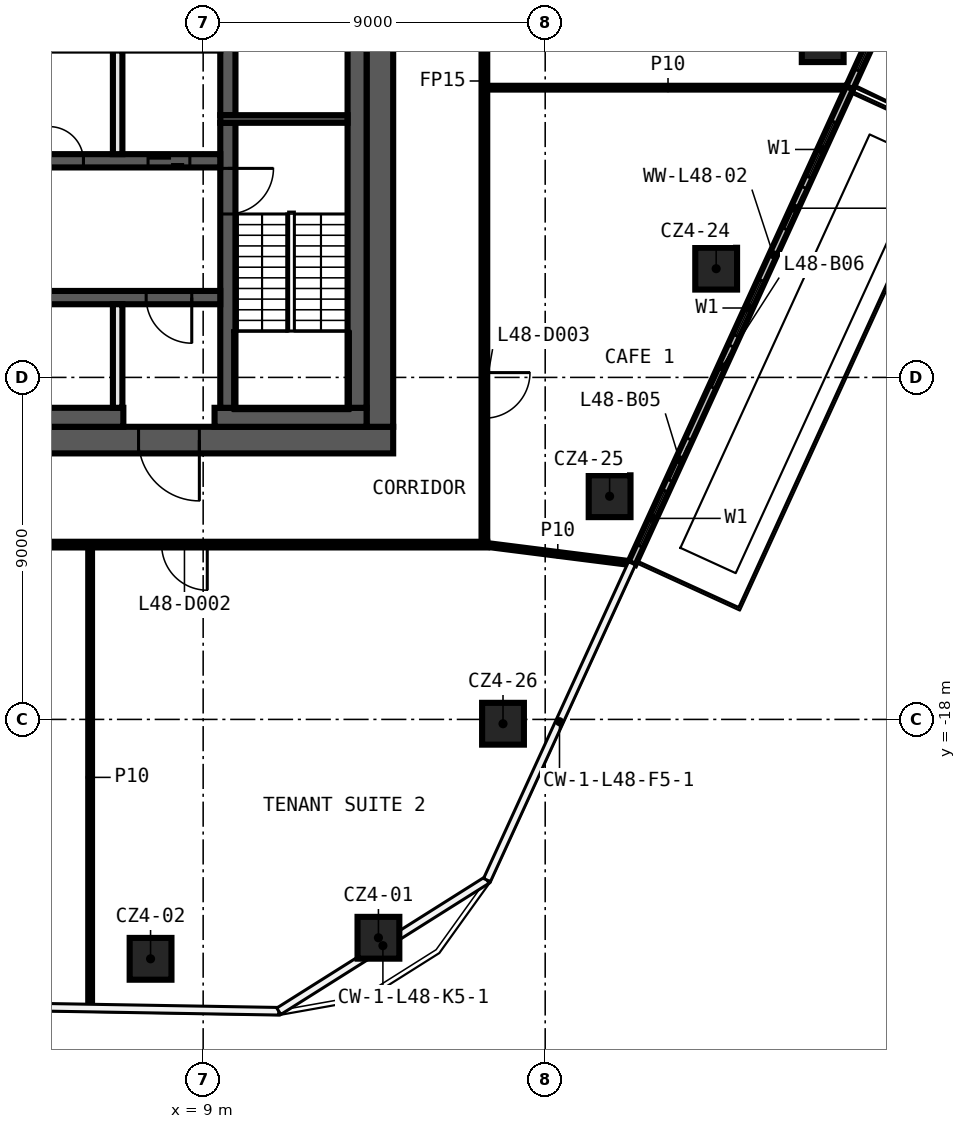
"""IFC4 building model, lengths in metres.
Left out: names, types, materials, properties, quantities, classifications, styles, units other than length and angle.
Written with IfcOpenShell. Run it as: python <this file> out.ifc"""

import sys

from ifc_helpers import new_model, si_unit, direction, frame, frame_2d, origin, origin_2d, place, context, subcontext, project, spatial, rectangle, extrude, element, fill, save


model = new_model("IFC4")
c1 = context("Model", 3, precision=1e-05, world=origin(), true_north=direction((0.0, 1.0)))
c2 = subcontext(c1, "Body", "Model", "MODEL_VIEW")
j1 = project(units=[si_unit("LENGTHUNIT", "METRE"), si_unit("PLANEANGLEUNIT", "RADIAN")], contexts=[c1])
p1 = place(None, origin())
s1 = spatial("IfcSite", under=j1, at=p1, CompositionType="ELEMENT")
p2 = place(p1, origin())
s2 = spatial("IfcBuilding", under=s1, at=p2, CompositionType="ELEMENT")
p3 = place(p2, frame((0.0, 0.0, 232.8)))
s3 = spatial("IfcBuildingStorey", under=s2, at=p3, CompositionType="ELEMENT", Elevation=232.8)
for number, where, z_axis, x_axis in (
    (1, (13.612, -23.746, 0.0), (0.0, 0.0, 1.0), (1.0, 0.0, 0.0)),
    (2, (7.616, -24.3, 0.0), (0.0, 0.0, 1.0), (1.0, 0.0, 0.0)),
    (3, (25.302, -0.152, 0.0), (0.0, 0.0, 1.0), (1.0, 0.0, 0.0)),
    (4, (22.499, -6.139, 0.0), (0.0, 0.0, 1.0), (1.0, 0.0, 0.0)),
    (5, (19.695, -12.127, 0.0), (0.0, 0.0, 1.0), (1.0, 0.0, 0.0)),
    (6, (16.89, -18.114, 0.0), (0.0, 0.0, 1.0), (1.0, 0.0, 0.0)),
):
    element("IfcColumn", number, at=place(p3, frame(where, z_axis=z_axis, x_axis=x_axis)), inside=s3, PredefinedType="COLUMN", context=c2, shape_type="SweptSolid", body=[
        extrude(rectangle(XDim=1.1, YDim=1.1, at=origin_2d()), origin(), (0.0, 0.0, 1.0), 3.75),
    ])
p4 = place(p3, frame((16.475, -13.4, 0.0), z_axis=(0.0, 0.0, 1.0), x_axis=(-1.0, 0.0, 0.0)))
e7 = element("IfcWall", 7, at=p4, inside=s3, PredefinedType="PARTITIONING", context=c2, shape_type="SweptSolid", body=[
    extrude(rectangle(XDim=18.55, YDim=0.15, at=frame_2d((9.275, 0.0))), origin(), (0.0, 0.0, 1.0), 3.75),
])
p5 = place(p4, frame((7.367, 0.0, 0.0)))
e8 = element("IfcOpeningElement", 8, at=p5, cuts=e7, PredefinedType="OPENING", context=c2, shape_type="SweptSolid", body=[
    extrude(rectangle(XDim=1.2, YDim=2.1, at=frame_2d((0.6, 1.05))), frame((0.0, 0.085, 0.0), z_axis=(0.0, -1.0, 0.0), x_axis=(1.0, 0.0, 0.0)), (0.0, 0.0, 1.0), 0.17),
])
p6 = place(p3, frame((16.475, -1.376, 0.0), z_axis=(0.0, 0.0, 1.0), x_axis=(1.0, 0.0, 0.0)))
e9 = element("IfcWall", 9, at=p6, inside=s3, PredefinedType="PARTITIONING", context=c2, shape_type="SweptSolid", body=[
    extrude(rectangle(XDim=9.514, YDim=0.1, at=frame_2d((4.757, 0.0))), origin(), (0.0, 0.0, 1.0), 3.75),
])
p7 = place(p3, frame((16.4, 13.325, 0.0), z_axis=(0.0, 0.0, 1.0), x_axis=(0.0, -1.0, 0.0)))
e10 = element("IfcWall", 10, at=p7, inside=s3, PredefinedType="PARTITIONING", context=c2, shape_type="SweptSolid", body=[
    extrude(rectangle(XDim=26.65, YDim=0.15, at=frame_2d((13.325, 0.0))), origin(), (0.0, 0.0, 1.0), 3.75),
])
p8 = place(p7, frame((22.199, 0.0, 0.0)))
e11 = element("IfcOpeningElement", 11, at=p8, cuts=e10, PredefinedType="OPENING", context=c2, shape_type="SweptSolid", body=[
    extrude(rectangle(XDim=1.2, YDim=2.1, at=frame_2d((0.6, 1.05))), frame((0.0, 0.085, 0.0), z_axis=(0.0, -1.0, 0.0), x_axis=(1.0, 0.0, 0.0)), (0.0, 0.0, 1.0), 0.17),
])
p9 = place(p7, frame((5.651, 0.0, 0.0)))
e12 = element("IfcOpeningElement", 12, at=p9, cuts=e10, PredefinedType="OPENING", context=c2, shape_type="SweptSolid", body=[
    extrude(rectangle(XDim=1.2, YDim=2.1, at=frame_2d((0.6, 1.05))), frame((0.0, 0.085, 0.0), z_axis=(0.0, -1.0, 0.0), x_axis=(1.0, 0.0, 0.0)), (0.0, 0.0, 1.0), 0.17),
])
p10 = place(p3, frame((6.026, -25.576, 0.0), z_axis=(0.0, 0.0, 1.0), x_axis=(0.0, 1.0, 0.0)))
e13 = element("IfcWall", 13, at=p10, inside=s3, PredefinedType="PARTITIONING", context=c2, shape_type="SweptSolid", body=[
    extrude(rectangle(XDim=12.101, YDim=0.1, at=frame_2d((6.05, 0.0))), origin(), (0.0, 0.0, 1.0), 3.75),
])
p11 = place(p3, frame((16.4, -13.4, 0.0), z_axis=(0.0, 0.0, 1.0), x_axis=(0.992073977013, -0.125655179493, 0.0)))
e14 = element("IfcWall", 14, at=p11, inside=s3, PredefinedType="PARTITIONING", context=c2, shape_type="SweptSolid", body=[
    extrude(rectangle(XDim=3.894, YDim=0.1, at=frame_2d((1.947, 0.0))), origin(), (0.0, 0.0, 1.0), 3.75),
])
p12 = place(p3, frame((20.283, -13.892, 0.0), z_axis=(0.0, 0.0, 1.0), x_axis=(0.416106802435, 0.909315747674, 0.0)))
e15 = element("IfcWall", 15, at=p12, inside=s3, PredefinedType="SOLIDWALL", context=c2, shape_type="SweptSolid", body=[
    extrude(rectangle(XDim=13.765, YDim=0.2, at=frame_2d((6.882, 0.0))), origin(), (0.0, 0.0, 1.0), 3.75),
])
p13 = place(p12, frame((0.5, 0.0, 0.6)))
e16 = element("IfcOpeningElement", 16, at=p13, cuts=e15, PredefinedType="OPENING", context=c2, shape_type="SweptSolid", body=[
    extrude(rectangle(XDim=1.6, YDim=2.4, at=frame_2d((0.8, 1.2))), frame((0.0, 0.11, 0.0), z_axis=(0.0, -1.0, 0.0), x_axis=(1.0, 0.0, 0.0)), (0.0, 0.0, 1.0), 0.22),
])
p14 = place(p12, frame((2.4, 0.0, 0.0)))
e17 = element("IfcOpeningElement", 17, at=p14, cuts=e15, PredefinedType="OPENING", context=c2, shape_type="SweptSolid", body=[
    extrude(rectangle(XDim=1.2, YDim=2.4, at=frame_2d((0.6, 1.2))), frame((0.0, 0.11, 0.0), z_axis=(0.0, -1.0, 0.0), x_axis=(1.0, 0.0, 0.0)), (0.0, 0.0, 1.0), 0.22),
])
p15 = place(p12, frame((6.588, 0.0, 0.6)))
e18 = element("IfcOpeningElement", 18, at=p15, cuts=e15, PredefinedType="OPENING", context=c2, shape_type="SweptSolid", body=[
    extrude(rectangle(XDim=1.6, YDim=2.4, at=frame_2d((0.8, 1.2))), frame((0.0, 0.11, 0.0), z_axis=(0.0, -1.0, 0.0), x_axis=(1.0, 0.0, 0.0)), (0.0, 0.0, 1.0), 0.22),
])
p16 = place(p12, frame((5.088, 0.0, 0.0)))
e19 = element("IfcOpeningElement", 19, at=p16, cuts=e15, PredefinedType="OPENING", context=c2, shape_type="SweptSolid", body=[
    extrude(rectangle(XDim=1.2, YDim=2.4, at=frame_2d((0.6, 1.2))), frame((0.0, 0.11, 0.0), z_axis=(0.0, -1.0, 0.0), x_axis=(1.0, 0.0, 0.0)), (0.0, 0.0, 1.0), 0.22),
])
p17 = place(p12, frame((11.176, 0.0, 0.6)))
e20 = element("IfcOpeningElement", 20, at=p17, cuts=e15, PredefinedType="OPENING", context=c2, shape_type="SweptSolid", body=[
    extrude(rectangle(XDim=1.6, YDim=2.4, at=frame_2d((0.8, 1.2))), frame((0.0, 0.11, 0.0), z_axis=(0.0, -1.0, 0.0), x_axis=(1.0, 0.0, 0.0)), (0.0, 0.0, 1.0), 0.22),
])
p18 = place(p12, frame((9.676, 0.0, 0.0)))
e21 = element("IfcOpeningElement", 21, at=p18, cuts=e15, PredefinedType="OPENING", context=c2, shape_type="SweptSolid", body=[
    extrude(rectangle(XDim=1.2, YDim=2.4, at=frame_2d((0.6, 1.2))), frame((0.0, 0.11, 0.0), z_axis=(0.0, -1.0, 0.0), x_axis=(1.0, 0.0, 0.0)), (0.0, 0.0, 1.0), 0.22),
])
p19 = place(p3, frame((26.011, -1.376, 0.0), z_axis=(0.0, 0.0, 1.0), x_axis=(0.416127690122, 0.909306189088, 0.0)))
e22 = element("IfcWall", 22, at=p19, inside=s3, PredefinedType="SOLIDWALL", context=c2, shape_type="SweptSolid", body=[
    extrude(rectangle(XDim=4.579, YDim=0.2, at=frame_2d((2.289, 0.0))), origin(), (0.0, 0.0, 1.0), 3.75),
])
p20 = place(p19, frame((0.5, 0.0, 0.6)))
e23 = element("IfcOpeningElement", 23, at=p20, cuts=e22, PredefinedType="OPENING", context=c2, shape_type="SweptSolid", body=[
    extrude(rectangle(XDim=1.6, YDim=2.4, at=frame_2d((0.8, 1.2))), frame((0.0, 0.11, 0.0), z_axis=(0.0, -1.0, 0.0), x_axis=(1.0, 0.0, 0.0)), (0.0, 0.0, 1.0), 0.22),
])
p21 = place(p19, frame((2.4, 0.0, 0.0)))
e24 = element("IfcOpeningElement", 24, at=p21, cuts=e22, PredefinedType="OPENING", context=c2, shape_type="SweptSolid", body=[
    extrude(rectangle(XDim=1.2, YDim=2.4, at=frame_2d((0.6, 1.2))), frame((0.0, 0.11, 0.0), z_axis=(0.0, -1.0, 0.0), x_axis=(1.0, 0.0, 0.0)), (0.0, 0.0, 1.0), 0.22),
])
p22 = place(p3, frame((14.0, -10.65, 0.0), z_axis=(0.0, 0.0, 1.0), x_axis=(-1.0, 0.0, 0.0)))
e25 = element("IfcWall", 25, at=p22, inside=s3, PredefinedType="SHEAR", context=c2, shape_type="SweptSolid", body=[
    extrude(rectangle(XDim=28.0, YDim=0.7, at=frame_2d((14.0, 0.0))), origin(), (0.0, 0.0, 1.0), 3.75),
])
p23 = place(p22, frame((5.1, 0.0, 0.0)))
e26 = element("IfcOpeningElement", 26, at=p23, cuts=e25, PredefinedType="OPENING", context=c2, shape_type="SweptSolid", body=[
    extrude(rectangle(XDim=1.6, YDim=2.1, at=frame_2d((0.8, 1.05))), frame((0.0, 0.36, 0.0), z_axis=(0.0, -1.0, 0.0), x_axis=(1.0, 0.0, 0.0)), (0.0, 0.0, 1.0), 0.72),
])
p24 = place(p3, frame((13.65, 10.3, 0.0), z_axis=(0.0, 0.0, 1.0), x_axis=(0.0, -1.0, 0.0)))
e27 = element("IfcWall", 27, at=p24, inside=s3, PredefinedType="SHEAR", context=c2, shape_type="SweptSolid", body=[
    extrude(rectangle(XDim=20.6, YDim=0.7, at=frame_2d((10.3, 0.0))), origin(), (0.0, 0.0, 1.0), 3.75),
])
p25 = place(p3, frame((13.3, -10.05, 0.0), z_axis=(0.0, 0.0, 1.0), x_axis=(-1.0, 0.0, 0.0)))
e28 = element("IfcWall", 28, at=p25, inside=s3, PredefinedType="SHEAR", context=c2, shape_type="SweptSolid", body=[
    extrude(rectangle(XDim=4.0, YDim=0.5, at=frame_2d((2.0, 0.0))), origin(), (0.0, 0.0, 1.0), 3.75),
])
p26 = place(p3, frame((6.9, -10.05, 0.0), z_axis=(0.0, 0.0, 1.0), x_axis=(-1.0, 0.0, 0.0)))
e29 = element("IfcWall", 29, at=p26, inside=s3, PredefinedType="SHEAR", context=c2, shape_type="SweptSolid", body=[
    extrude(rectangle(XDim=20.2, YDim=0.5, at=frame_2d((10.1, 0.0))), origin(), (0.0, 0.0, 1.0), 3.75),
])
p27 = place(p3, frame((13.05, 9.8, 0.0), z_axis=(0.0, 0.0, 1.0), x_axis=(0.0, -1.0, 0.0)))
e30 = element("IfcWall", 30, at=p27, inside=s3, PredefinedType="SHEAR", context=c2, shape_type="SweptSolid", body=[
    extrude(rectangle(XDim=19.6, YDim=0.5, at=frame_2d((9.8, 0.0))), origin(), (0.0, 0.0, 1.0), 3.75),
])
p28 = place(p3, frame((9.65, -2.3, 0.0), z_axis=(0.0, 0.0, 1.0), x_axis=(0.0, -1.0, 0.0)))
e31 = element("IfcWall", 31, at=p28, inside=s3, PredefinedType="SHEAR", context=c2, shape_type="SweptSolid", body=[
    extrude(rectangle(XDim=7.5, YDim=0.4, at=frame_2d((3.75, 0.0))), origin(), (0.0, 0.0, 1.0), 3.75),
])
p29 = place(p28, frame((1.2, 0.0, 0.0)))
e32 = element("IfcOpeningElement", 32, at=p29, cuts=e31, PredefinedType="OPENING", context=c2, shape_type="SweptSolid", body=[
    extrude(rectangle(XDim=1.2, YDim=2.1, at=frame_2d((0.6, 1.05))), frame((0.0, 0.21, 0.0), z_axis=(0.0, -1.0, 0.0), x_axis=(1.0, 0.0, 0.0)), (0.0, 0.0, 1.0), 0.42),
])
p30 = place(p3, frame((9.65, 2.1, 0.0), z_axis=(0.0, 0.0, 1.0), x_axis=(0.0, -1.0, 0.0)))
e33 = element("IfcWall", 33, at=p30, inside=s3, PredefinedType="SHEAR", context=c2, shape_type="SweptSolid", body=[
    extrude(rectangle(XDim=4.2, YDim=0.4, at=frame_2d((2.1, 0.0))), origin(), (0.0, 0.0, 1.0), 3.75),
])
p31 = place(p30, frame((0.15, 0.0, 0.0)))
e34 = element("IfcOpeningElement", 34, at=p31, cuts=e33, PredefinedType="OPENING", context=c2, shape_type="SweptSolid", body=[
    extrude(rectangle(XDim=0.9, YDim=2.1, at=frame_2d((0.45, 1.05))), frame((0.0, 0.21, 0.0), z_axis=(0.0, -1.0, 0.0), x_axis=(1.0, 0.0, 0.0)), (0.0, 0.0, 1.0), 0.42),
])
p32 = place(p3, frame((9.45, -2.2, 0.0), z_axis=(0.0, 0.0, 1.0), x_axis=(1.0, 0.0, 0.0)))
e35 = element("IfcWall", 35, at=p32, inside=s3, PredefinedType="SHEAR", context=c2, shape_type="SweptSolid", body=[
    extrude(rectangle(XDim=3.35, YDim=0.2, at=frame_2d((1.675, 0.0))), origin(), (0.0, 0.0, 1.0), 3.75),
])
p33 = place(p3, frame((-9.45, -3.3, 0.0), z_axis=(0.0, 0.0, 1.0), x_axis=(1.0, 0.0, 0.0)))
e36 = element("IfcWall", 36, at=p33, inside=s3, PredefinedType="SHEAR", context=c2, shape_type="SweptSolid", body=[
    extrude(rectangle(XDim=18.9, YDim=0.35, at=frame_2d((9.45, 0.0))), origin(), (0.0, 0.0, 1.0), 3.75),
])
p34 = place(p33, frame((0.8, 0.0, 0.0)))
e37 = element("IfcOpeningElement", 37, at=p34, cuts=e36, PredefinedType="OPENING", context=c2, shape_type="SweptSolid", body=[
    extrude(rectangle(XDim=1.1, YDim=2.1, at=frame_2d((0.55, 1.05))), frame((0.0, 0.185, 0.0), z_axis=(0.0, -1.0, 0.0), x_axis=(1.0, 0.0, 0.0)), (0.0, 0.0, 1.0), 0.37),
])
p35 = place(p33, frame((3.5, 0.0, 0.0)))
e38 = element("IfcOpeningElement", 38, at=p35, cuts=e36, PredefinedType="OPENING", context=c2, shape_type="SweptSolid", body=[
    extrude(rectangle(XDim=1.1, YDim=2.1, at=frame_2d((0.55, 1.05))), frame((0.0, 0.185, 0.0), z_axis=(0.0, -1.0, 0.0), x_axis=(1.0, 0.0, 0.0)), (0.0, 0.0, 1.0), 0.37),
])
p36 = place(p33, frame((6.2, 0.0, 0.0)))
e39 = element("IfcOpeningElement", 39, at=p36, cuts=e36, PredefinedType="OPENING", context=c2, shape_type="SweptSolid", body=[
    extrude(rectangle(XDim=1.1, YDim=2.1, at=frame_2d((0.55, 1.05))), frame((0.0, 0.185, 0.0), z_axis=(0.0, -1.0, 0.0), x_axis=(1.0, 0.0, 0.0)), (0.0, 0.0, 1.0), 0.37),
])
p37 = place(p33, frame((8.9, 0.0, 0.0)))
e40 = element("IfcOpeningElement", 40, at=p37, cuts=e36, PredefinedType="OPENING", context=c2, shape_type="SweptSolid", body=[
    extrude(rectangle(XDim=1.1, YDim=2.1, at=frame_2d((0.55, 1.05))), frame((0.0, 0.185, 0.0), z_axis=(0.0, -1.0, 0.0), x_axis=(1.0, 0.0, 0.0)), (0.0, 0.0, 1.0), 0.37),
])
p38 = place(p33, frame((17.0, 0.0, 0.0)))
e41 = element("IfcOpeningElement", 41, at=p38, cuts=e36, PredefinedType="OPENING", context=c2, shape_type="SweptSolid", body=[
    extrude(rectangle(XDim=1.1, YDim=2.1, at=frame_2d((0.55, 1.05))), frame((0.0, 0.185, 0.0), z_axis=(0.0, -1.0, 0.0), x_axis=(1.0, 0.0, 0.0)), (0.0, 0.0, 1.0), 0.37),
])
p39 = place(p33, frame((11.7, 0.0, 0.0)))
e42 = element("IfcOpeningElement", 42, at=p39, cuts=e36, PredefinedType="OPENING", context=c2, shape_type="SweptSolid", body=[
    extrude(rectangle(XDim=0.9, YDim=2.1, at=frame_2d((0.45, 1.05))), frame((0.0, 0.185, 0.0), z_axis=(0.0, -1.0, 0.0), x_axis=(1.0, 0.0, 0.0)), (0.0, 0.0, 1.0), 0.37),
])
p40 = place(p33, frame((14.4, 0.0, 0.0)))
e43 = element("IfcOpeningElement", 43, at=p40, cuts=e36, PredefinedType="OPENING", context=c2, shape_type="SweptSolid", body=[
    extrude(rectangle(XDim=0.9, YDim=2.1, at=frame_2d((0.45, 1.05))), frame((0.0, 0.185, 0.0), z_axis=(0.0, -1.0, 0.0), x_axis=(1.0, 0.0, 0.0)), (0.0, 0.0, 1.0), 0.37),
])
p41 = place(p3, frame((9.45, -6.9, 0.0), z_axis=(0.0, 0.0, 1.0), x_axis=(-1.0, 0.0, 0.0)))
e44 = element("IfcWall", 44, at=p41, inside=s3, PredefinedType="SHEAR", context=c2, shape_type="SweptSolid", body=[
    extrude(rectangle(XDim=18.9, YDim=0.35, at=frame_2d((9.45, 0.0))), origin(), (0.0, 0.0, 1.0), 3.75),
])
p42 = place(p41, frame((0.75, 0.0, 0.0)))
e45 = element("IfcOpeningElement", 45, at=p42, cuts=e44, PredefinedType="OPENING", context=c2, shape_type="SweptSolid", body=[
    extrude(rectangle(XDim=1.2, YDim=2.1, at=frame_2d((0.6, 1.05))), frame((0.0, 0.185, 0.0), z_axis=(0.0, -1.0, 0.0), x_axis=(1.0, 0.0, 0.0)), (0.0, 0.0, 1.0), 0.37),
])
p43 = place(p41, frame((15.75, 0.0, 0.0)))
e46 = element("IfcOpeningElement", 46, at=p43, cuts=e44, PredefinedType="OPENING", context=c2, shape_type="SweptSolid", body=[
    extrude(rectangle(XDim=0.9, YDim=2.1, at=frame_2d((0.45, 1.05))), frame((0.0, 0.185, 0.0), z_axis=(0.0, -1.0, 0.0), x_axis=(1.0, 0.0, 0.0)), (0.0, 0.0, 1.0), 0.37),
])
p44 = place(p41, frame((10.35, 0.0, 0.0)))
e47 = element("IfcOpeningElement", 47, at=p44, cuts=e44, PredefinedType="OPENING", context=c2, shape_type="SweptSolid", body=[
    extrude(rectangle(XDim=0.9, YDim=2.1, at=frame_2d((0.45, 1.05))), frame((0.0, 0.185, 0.0), z_axis=(0.0, -1.0, 0.0), x_axis=(1.0, 0.0, 0.0)), (0.0, 0.0, 1.0), 0.37),
])
for number, where, z_axis, x_axis in (
    (48, (6.75, -9.8, 0.0), (0.0, 0.0, 1.0), (0.0, 1.0, 0.0)),
    (49, (6.75, -3.125, 0.0), (0.0, 0.0, 1.0), (0.0, 1.0, 0.0)),
):
    element("IfcWall", number, at=place(p3, frame(where, z_axis=z_axis, x_axis=x_axis)), inside=s3, PredefinedType="SOLIDWALL", context=c2, shape_type="SweptSolid", body=[
        extrude(rectangle(XDim=2.725, YDim=0.25, at=frame_2d((1.363, 0.0))), origin(), (0.0, 0.0, 1.0), 3.75),
    ])
p45 = place(p5, origin())
e50 = element("IfcDoor", 50, at=p45, inside=s3, OperationType="SINGLE_SWING_LEFT", PredefinedType="DOOR", context=c2, shape_type="SweptSolid", body=[
    extrude(rectangle(XDim=1.2, YDim=2.1, at=frame_2d((0.6, 1.05))), frame((0.0, 0.025, 0.0), z_axis=(0.0, -1.0, 0.0), x_axis=(1.0, 0.0, 0.0)), (0.0, 0.0, 1.0), 0.05),
])
fill(e8, e50)
p46 = place(p8, origin())
e51 = element("IfcDoor", 51, at=p46, inside=s3, OperationType="SINGLE_SWING_RIGHT", PredefinedType="DOOR", context=c2, shape_type="SweptSolid", body=[
    extrude(rectangle(XDim=1.2, YDim=2.1, at=frame_2d((0.6, 1.05))), frame((0.0, 0.025, 0.0), z_axis=(0.0, -1.0, 0.0), x_axis=(1.0, 0.0, 0.0)), (0.0, 0.0, 1.0), 0.05),
])
fill(e11, e51)
p47 = place(p13, origin())
e52 = element("IfcWindow", 52, at=p47, inside=s3, PartitioningType="SINGLE_PANEL", PredefinedType="WINDOW", context=c2, shape_type="SweptSolid", body=[
    extrude(rectangle(XDim=1.6, YDim=2.4, at=frame_2d((0.8, 1.2))), frame((0.0, 0.03, 0.0), z_axis=(0.0, -1.0, 0.0), x_axis=(1.0, 0.0, 0.0)), (0.0, 0.0, 1.0), 0.06),
])
fill(e16, e52)
p48 = place(p14, origin())
e53 = element("IfcDoor", 53, at=p48, inside=s3, OperationType="SLIDING_TO_LEFT", PredefinedType="DOOR", context=c2, shape_type="SweptSolid", body=[
    extrude(rectangle(XDim=1.2, YDim=2.4, at=frame_2d((0.6, 1.2))), frame((0.0, 0.025, 0.0), z_axis=(0.0, -1.0, 0.0), x_axis=(1.0, 0.0, 0.0)), (0.0, 0.0, 1.0), 0.05),
])
fill(e17, e53)
p49 = place(p15, origin())
e54 = element("IfcWindow", 54, at=p49, inside=s3, PartitioningType="SINGLE_PANEL", PredefinedType="WINDOW", context=c2, shape_type="SweptSolid", body=[
    extrude(rectangle(XDim=1.6, YDim=2.4, at=frame_2d((0.8, 1.2))), frame((0.0, 0.03, 0.0), z_axis=(0.0, -1.0, 0.0), x_axis=(1.0, 0.0, 0.0)), (0.0, 0.0, 1.0), 0.06),
])
fill(e18, e54)
p50 = place(p16, origin())
e55 = element("IfcDoor", 55, at=p50, inside=s3, OperationType="SLIDING_TO_LEFT", PredefinedType="DOOR", context=c2, shape_type="SweptSolid", body=[
    extrude(rectangle(XDim=1.2, YDim=2.4, at=frame_2d((0.6, 1.2))), frame((0.0, 0.025, 0.0), z_axis=(0.0, -1.0, 0.0), x_axis=(1.0, 0.0, 0.0)), (0.0, 0.0, 1.0), 0.05),
])
fill(e19, e55)
p51 = place(p17, origin())
e56 = element("IfcWindow", 56, at=p51, inside=s3, PartitioningType="SINGLE_PANEL", PredefinedType="WINDOW", context=c2, shape_type="SweptSolid", body=[
    extrude(rectangle(XDim=1.6, YDim=2.4, at=frame_2d((0.8, 1.2))), frame((0.0, 0.03, 0.0), z_axis=(0.0, -1.0, 0.0), x_axis=(1.0, 0.0, 0.0)), (0.0, 0.0, 1.0), 0.06),
])
fill(e20, e56)
p52 = place(p18, origin())
e57 = element("IfcDoor", 57, at=p52, inside=s3, OperationType="SLIDING_TO_LEFT", PredefinedType="DOOR", context=c2, shape_type="SweptSolid", body=[
    extrude(rectangle(XDim=1.2, YDim=2.4, at=frame_2d((0.6, 1.2))), frame((0.0, 0.025, 0.0), z_axis=(0.0, -1.0, 0.0), x_axis=(1.0, 0.0, 0.0)), (0.0, 0.0, 1.0), 0.05),
])
fill(e21, e57)
p53 = place(p20, origin())
e58 = element("IfcWindow", 58, at=p53, inside=s3, PartitioningType="SINGLE_PANEL", PredefinedType="WINDOW", context=c2, shape_type="SweptSolid", body=[
    extrude(rectangle(XDim=1.6, YDim=2.4, at=frame_2d((0.8, 1.2))), frame((0.0, 0.03, 0.0), z_axis=(0.0, -1.0, 0.0), x_axis=(1.0, 0.0, 0.0)), (0.0, 0.0, 1.0), 0.06),
])
fill(e23, e58)
p54 = place(p38, origin())
e59 = element("IfcDoor", 59, at=p54, inside=s3, OperationType="DOUBLE_DOOR_SLIDING", PredefinedType="DOOR", context=c2, shape_type="SweptSolid", body=[
    extrude(rectangle(XDim=1.1, YDim=2.1, at=frame_2d((0.55, 1.05))), frame((0.0, 0.025, 0.0), z_axis=(0.0, -1.0, 0.0), x_axis=(1.0, 0.0, 0.0)), (0.0, 0.0, 1.0), 0.05),
])
fill(e41, e59)
p55 = place(p23, origin())
e60 = element("IfcDoor", 60, at=p55, inside=s3, OperationType="DOUBLE_DOOR_SINGLE_SWING", PredefinedType="DOOR", context=c2, shape_type="SweptSolid", body=[
    extrude(rectangle(XDim=1.6, YDim=2.1, at=frame_2d((0.8, 1.05))), frame((0.0, 0.025, 0.0), z_axis=(0.0, -1.0, 0.0), x_axis=(1.0, 0.0, 0.0)), (0.0, 0.0, 1.0), 0.05),
])
fill(e26, e60)
p56 = place(p42, origin())
e61 = element("IfcDoor", 61, at=p56, inside=s3, OperationType="SINGLE_SWING_LEFT", PredefinedType="DOOR", context=c2, shape_type="SweptSolid", body=[
    extrude(rectangle(XDim=1.2, YDim=2.1, at=frame_2d((0.6, 1.05))), frame((0.0, 0.025, 0.0), z_axis=(0.0, -1.0, 0.0), x_axis=(1.0, 0.0, 0.0)), (0.0, 0.0, 1.0), 0.05),
])
fill(e45, e61)
p57 = place(p40, origin())
e62 = element("IfcDoor", 62, at=p57, inside=s3, OperationType="SINGLE_SWING_LEFT", PredefinedType="DOOR", context=c2, shape_type="SweptSolid", body=[
    extrude(rectangle(XDim=0.9, YDim=2.1, at=frame_2d((0.45, 1.05))), frame((0.0, 0.025, 0.0), z_axis=(0.0, -1.0, 0.0), x_axis=(1.0, 0.0, 0.0)), (0.0, 0.0, 1.0), 0.05),
])
fill(e43, e62)
p58 = place(p29, origin())
e63 = element("IfcDoor", 63, at=p58, inside=s3, OperationType="SINGLE_SWING_RIGHT", PredefinedType="DOOR", context=c2, shape_type="SweptSolid", body=[
    extrude(rectangle(XDim=1.2, YDim=2.1, at=frame_2d((0.6, 1.05))), frame((0.0, 0.025, 0.0), z_axis=(0.0, -1.0, 0.0), x_axis=(1.0, 0.0, 0.0)), (0.0, 0.0, 1.0), 0.05),
])
fill(e32, e63)
save(model, sys.argv[1])
